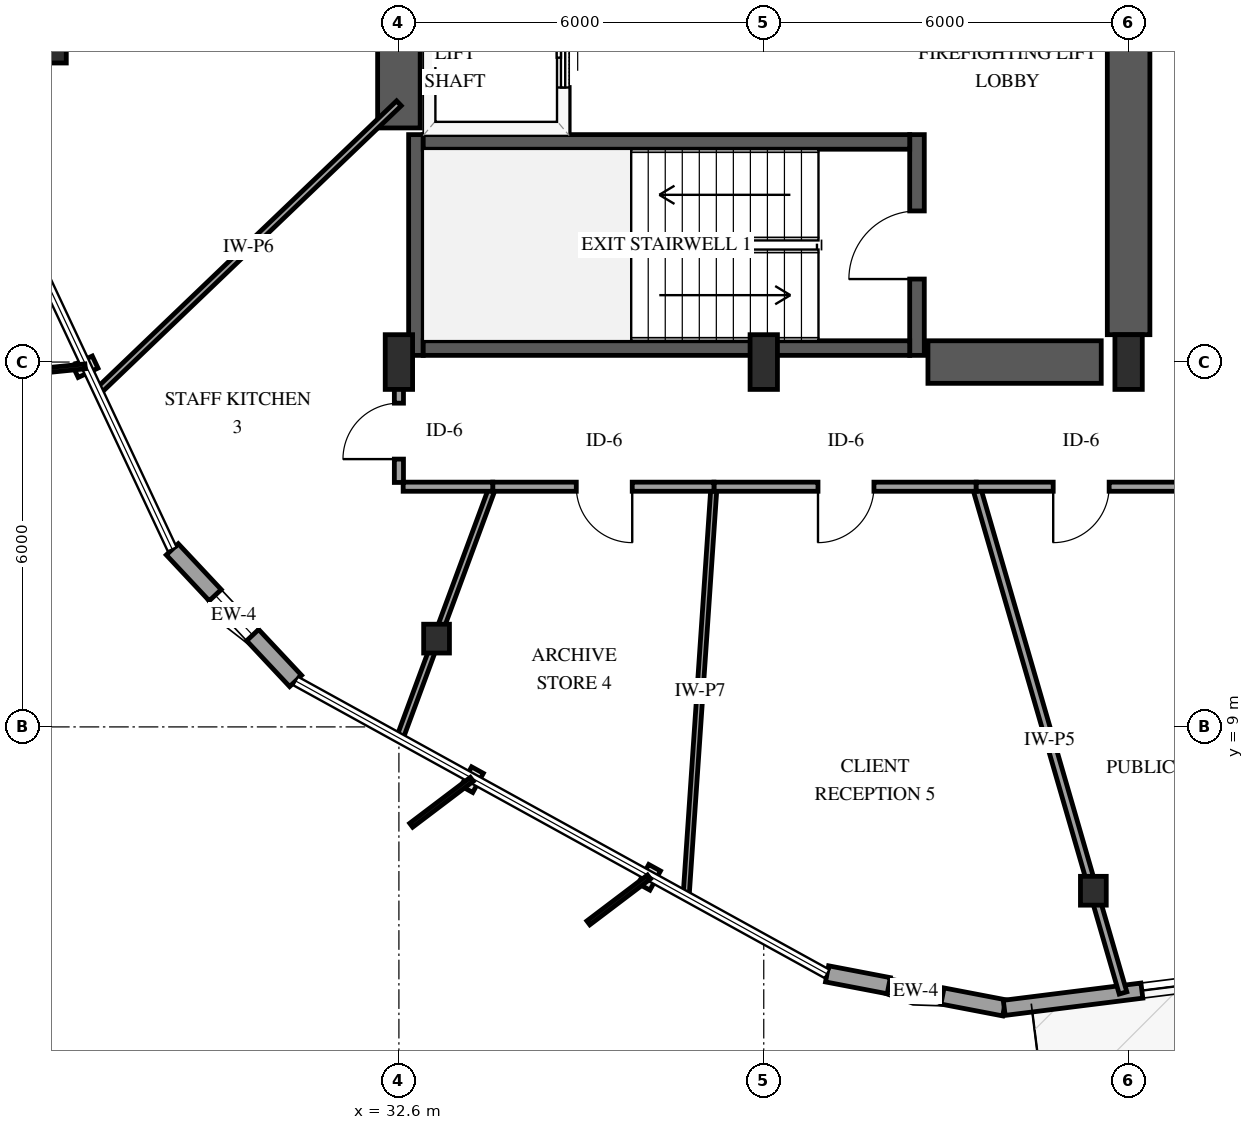
"""IFC4 building model, lengths in metres.
Left out: names, types, materials, properties, quantities, classifications, styles, units other than length and angle.
Written with IfcOpenShell. Run it as: python <this file> out.ifc"""

import sys

from ifc_helpers import new_model, si_unit, direction, frame, frame_2d, origin, origin_2d, place, context, subcontext, project, spatial, rectangle, i_section, extrude, element, fill, save


model = new_model("IFC4")
c1 = context("Model", 3, precision=1e-05, world=origin(), true_north=direction((0.0, 1.0)))
c2 = subcontext(c1, "Body", "Model", "MODEL_VIEW")
j1 = project(units=[si_unit("LENGTHUNIT", "METRE"), si_unit("PLANEANGLEUNIT", "RADIAN")], contexts=[c1])
p1 = place(None, origin())
s1 = spatial("IfcSite", under=j1, at=p1, CompositionType="ELEMENT")
p2 = place(p1, origin())
s2 = spatial("IfcBuilding", under=s1, at=p2, CompositionType="ELEMENT")
p3 = place(p2, frame((0.0, 0.0, 54.6)))
s3 = spatial("IfcBuildingStorey", under=s2, at=p3, CompositionType="ELEMENT", Elevation=54.6)
p4 = place(p3, frame((32.88, 15.11, 0.0), z_axis=(0.0, 0.0, 1.0), x_axis=(0.0, 1.0, 0.0)))
e1 = element("IfcWall", 1, at=p4, inside=s3, PredefinedType="SHEAR", context=c2, shape_type="SweptSolid", body=[
    extrude(rectangle(XDim=3.63, YDim=0.24, at=frame_2d((1.815, 0.0))), origin(), (0.0, 0.0, 1.0), 4.0),
])
p5 = place(p3, frame((41.12, 15.11, 0.0), z_axis=(0.0, 0.0, 1.0), x_axis=(0.0, 1.0, 0.0)))
e2 = element("IfcWall", 2, at=p5, inside=s3, PredefinedType="SHEAR", context=c2, shape_type="SweptSolid", body=[
    extrude(rectangle(XDim=3.63, YDim=0.24, at=frame_2d((1.815, 0.0))), origin(), (0.0, 0.0, 1.0), 4.0),
])
p6 = place(p5, frame((1.255, 0.0, 0.0)))
e3 = element("IfcOpeningElement", 3, at=p6, cuts=e2, PredefinedType="OPENING", context=c2, shape_type="SweptSolid", body=[
    extrude(rectangle(XDim=1.12, YDim=2.15, at=frame_2d((0.56, 1.075))), frame((0.0, 0.13, 0.0), z_axis=(0.0, -1.0, 0.0), x_axis=(1.0, 0.0, 0.0)), (0.0, 0.0, 1.0), 0.26),
])
for number, where, z_axis, x_axis in (
    (4, (33.0, 15.23, 0.0), (0.0, 0.0, 1.0), (1.0, 0.0, 0.0)),
    (5, (33.0, 18.62, 0.0), (0.0, 0.0, 1.0), (1.0, 0.0, 0.0)),
):
    element("IfcWall", number, at=place(p3, frame(where, z_axis=z_axis, x_axis=x_axis)), inside=s3, PredefinedType="SHEAR", context=c2, shape_type="SweptSolid", body=[
        extrude(rectangle(XDim=8.0, YDim=0.24, at=frame_2d((4.0, 0.0))), origin(), (0.0, 0.0, 1.0), 4.0),
    ])
p7 = place(p3, frame((32.6, 18.85, 0.0), z_axis=(0.0, 0.0, 1.0), x_axis=(0.0, 1.0, 0.0)))
e6 = element("IfcWall", 6, at=p7, inside=s3, PredefinedType="SHEAR", context=c2, shape_type="SweptSolid", body=[
    extrude(rectangle(XDim=12.3, YDim=0.7, at=frame_2d((6.15, 0.0))), origin(), (0.0, 0.0, 1.0), 4.0),
])
p8 = place(p3, frame((41.3, 15.0, 0.0), z_axis=(0.0, 0.0, 1.0), x_axis=(1.0, 0.0, 0.0)))
e7 = element("IfcWall", 7, at=p8, inside=s3, PredefinedType="SHEAR", context=c2, shape_type="SweptSolid", body=[
    extrude(rectangle(XDim=2.85, YDim=0.7, at=frame_2d((1.425, 0.0))), origin(), (0.0, 0.0, 1.0), 4.0),
])
p9 = place(p3, frame((44.6, 15.45, 0.0), z_axis=(0.0, 0.0, 1.0), x_axis=(0.0, 1.0, 0.0)))
e8 = element("IfcWall", 8, at=p9, inside=s3, PredefinedType="SHEAR", context=c2, shape_type="SweptSolid", body=[
    extrude(rectangle(XDim=6.35, YDim=0.7, at=frame_2d((3.175, 0.0))), origin(), (0.0, 0.0, 1.0), 4.0),
])
for number, where, z_axis, x_axis in (
    (9, (32.6, 15.0, 0.0), (0.0, 0.0, 1.0), (1.0, 0.0, 0.0)),
    (10, (38.6, 15.0, 0.0), (0.0, 0.0, 1.0), (1.0, 0.0, 0.0)),
    (11, (44.6, 15.0, 0.0), (0.0, 0.0, 1.0), (1.0, 0.0, 0.0)),
):
    element("IfcColumn", number, at=place(p3, frame(where, z_axis=z_axis, x_axis=x_axis)), inside=s3, PredefinedType="PILASTER", context=c2, shape_type="SweptSolid", body=[
        extrude(rectangle(XDim=0.45, YDim=0.9, at=origin_2d()), origin(), (0.0, 0.0, 1.0), 4.0),
    ])
for number, where, z_axis, x_axis in (
    (12, (26.918, 20.155, 0.0), (0.0, 0.0, 1.0), (1.0, 0.0, 0.0)),
    (13, (33.219, 10.452, 0.0), (0.0, 0.0, 1.0), (1.0, 0.0, 0.0)),
    (14, (44.02, 6.306, 0.0), (0.0, 0.0, 1.0), (1.0, 0.0, 0.0)),
):
    element("IfcColumn", number, at=place(p3, frame(where, z_axis=z_axis, x_axis=x_axis)), inside=s3, PredefinedType="COLUMN", context=c2, shape_type="SweptSolid", body=[
        extrude(i_section(OverallWidth=0.424, OverallDepth=0.474, WebThickness=0.048, FlangeThickness=0.077, FilletRadius=0.038, at=origin_2d()), origin(), (0.0, 0.0, 1.0), 4.0),
    ])
p10 = place(p3, frame((28.873, 11.92, 0.0), z_axis=(0.0, 0.0, 1.0), x_axis=(0.683815190571, -0.729655250885, 0.0)))
e15 = element("IfcWall", 15, at=p10, inside=s3, PredefinedType="SOLIDWALL", context=c2, shape_type="SweptSolid", body=[
    extrude(rectangle(XDim=2.967, YDim=0.27, at=frame_2d((1.483, 0.0))), origin(), (0.0, 0.0, 1.0), 3.079),
])
p11 = place(p10, frame((1.033, 0.0, 0.75)))
e16 = element("IfcOpeningElement", 16, at=p11, cuts=e15, PredefinedType="OPENING", context=c2, shape_type="SweptSolid", body=[
    extrude(rectangle(XDim=0.9, YDim=1.5, at=frame_2d((0.45, 0.75))), frame((0.0, 0.145, 0.0), z_axis=(0.0, -1.0, 0.0), x_axis=(1.0, 0.0, 0.0)), (0.0, 0.0, 1.0), 0.29),
])
p12 = place(p3, frame((39.641, 4.939, 0.0), z_axis=(0.0, 0.0, 1.0), x_axis=(0.982094979425, -0.188386441624, 0.0)))
e17 = element("IfcWall", 17, at=p12, inside=s3, PredefinedType="SOLIDWALL", context=c2, shape_type="SweptSolid", body=[
    extrude(rectangle(XDim=2.967, YDim=0.27, at=frame_2d((1.483, 0.0))), origin(), (0.0, 0.0, 1.0), 3.079),
])
p13 = place(p12, frame((1.033, 0.0, 0.75)))
e18 = element("IfcOpeningElement", 18, at=p13, cuts=e17, PredefinedType="OPENING", context=c2, shape_type="SweptSolid", body=[
    extrude(rectangle(XDim=0.9, YDim=1.5, at=frame_2d((0.45, 0.75))), frame((0.0, 0.145, 0.0), z_axis=(0.0, -1.0, 0.0), x_axis=(1.0, 0.0, 0.0)), (0.0, 0.0, 1.0), 0.29),
])
p14 = place(p3, frame((42.554, 4.38, 0.0), z_axis=(0.0, 0.0, 1.0), x_axis=(0.992243587308, 0.124308742439, 0.0)))
e19 = element("IfcWall", 19, at=p14, inside=s3, PredefinedType="SOLIDWALL", context=c2, shape_type="SweptSolid", body=[
    extrude(rectangle(XDim=9.979, YDim=0.25, at=frame_2d((4.99, 0.0))), origin(), (0.0, 0.0, 1.0), 3.079),
])
p15 = place(p14, frame((4.49, 0.0, 0.0)))
e20 = element("IfcOpeningElement", 20, at=p15, cuts=e19, PredefinedType="OPENING", context=c2, shape_type="SweptSolid", body=[
    extrude(rectangle(XDim=1.05, YDim=2.15, at=frame_2d((0.525, 1.075))), frame((0.0, 0.135, 0.0), z_axis=(0.0, -1.0, 0.0), x_axis=(1.0, 0.0, 0.0)), (0.0, 0.0, 1.0), 0.27),
])
p16 = place(p14, frame((2.281, 0.0, 0.72)))
e21 = element("IfcOpeningElement", 21, at=p16, cuts=e19, PredefinedType="OPENING", context=c2, shape_type="SweptSolid", body=[
    extrude(rectangle(XDim=1.2, YDim=1.6, at=frame_2d((0.6, 0.8))), frame((0.0, 0.135, 0.0), z_axis=(0.0, -1.0, 0.0), x_axis=(1.0, 0.0, 0.0)), (0.0, 0.0, 1.0), 0.27),
])
p17 = place(p14, frame((7.799, 0.0, 0.72)))
e22 = element("IfcOpeningElement", 22, at=p17, cuts=e19, PredefinedType="OPENING", context=c2, shape_type="SweptSolid", body=[
    extrude(rectangle(XDim=1.2, YDim=1.6, at=frame_2d((0.6, 0.8))), frame((0.0, 0.135, 0.0), z_axis=(0.0, -1.0, 0.0), x_axis=(1.0, 0.0, 0.0)), (0.0, 0.0, 1.0), 0.27),
])
p18 = place(p3, frame((35.3, 18.79, 0.0), z_axis=(0.0, 0.0, 1.0), x_axis=(0.0, 1.0, 0.0)))
e23 = element("IfcWall", 23, at=p18, inside=s3, PredefinedType="SOLIDWALL", context=c2, shape_type="SweptSolid", body=[
    extrude(rectangle(XDim=2.55, YDim=0.2, at=frame_2d((1.275, 0.0))), origin(), (0.0, 0.0, 1.0), 3.7),
])
p19 = place(p18, frame((0.725, 0.0, 0.0)))
e24 = element("IfcOpeningElement", 24, at=p19, cuts=e23, PredefinedType="OPENING", context=c2, shape_type="SweptSolid", body=[
    extrude(rectangle(XDim=1.1, YDim=2.15, at=frame_2d((0.55, 1.075))), frame((0.0, 0.11, 0.0), z_axis=(0.0, -1.0, 0.0), x_axis=(1.0, 0.0, 0.0)), (0.0, 0.0, 1.0), 0.22),
])
p20 = place(p3, frame((42.094, 12.95, 0.0), z_axis=(0.0, 0.0, 1.0), x_axis=(0.278506003646, -0.960434488101, 0.0)))
e25 = element("IfcWall", 25, at=p20, inside=s3, PredefinedType="PARTITIONING", context=c2, shape_type="SweptSolid", body=[
    extrude(rectangle(XDim=8.668, YDim=0.13, at=frame_2d((4.334, 0.0))), origin(), (0.0, 0.0, 1.0), 2.995),
])
p21 = place(p3, frame((32.6, 19.255, 0.0), z_axis=(0.0, 0.0, 1.0), x_axis=(-0.72235688482, -0.691520448687, 0.0)))
e26 = element("IfcWall", 26, at=p21, inside=s3, PredefinedType="PARTITIONING", context=c2, shape_type="SweptSolid", body=[
    extrude(rectangle(XDim=6.848, YDim=0.11, at=frame_2d((3.424, 0.0))), origin(), (0.0, 0.0, 1.0), 3.7),
])
p22 = place(p3, frame((37.781, 12.95, 0.0), z_axis=(0.0, 0.0, 1.0), x_axis=(-0.067858593443, -0.997694949018, 0.0)))
e27 = element("IfcWall", 27, at=p22, inside=s3, PredefinedType="PARTITIONING", context=c2, shape_type="SweptSolid", body=[
    extrude(rectangle(XDim=6.75, YDim=0.1, at=frame_2d((3.375, 0.0))), origin(), (0.0, 0.0, 1.0), 3.7),
])
p23 = place(p3, frame((34.143, 12.95, 0.0), z_axis=(0.0, 0.0, 1.0), x_axis=(-0.346807845611, -0.937936201574, 0.0)))
e28 = element("IfcWall", 28, at=p23, inside=s3, PredefinedType="PARTITIONING", context=c2, shape_type="SweptSolid", body=[
    extrude(rectangle(XDim=4.412, YDim=0.11, at=frame_2d((2.206, 0.0))), origin(), (0.0, 0.0, 1.0), 2.995),
])
p24 = place(p3, frame((42.094, 12.95, 0.0), z_axis=(0.0, 0.0, 1.0), x_axis=(-1.0, 0.0, 0.0)))
e29 = element("IfcWall", 29, at=p24, inside=s3, PredefinedType="PARTITIONING", context=c2, shape_type="SweptSolid", body=[
    extrude(rectangle(XDim=4.313, YDim=0.15, at=frame_2d((2.156, 0.0))), origin(), (0.0, 0.0, 1.0), 3.7),
])
p25 = place(p24, frame((1.682, 0.0, 0.0)))
e30 = element("IfcOpeningElement", 30, at=p25, cuts=e29, PredefinedType="OPENING", context=c2, shape_type="SweptSolid", body=[
    extrude(rectangle(XDim=0.92, YDim=2.12, at=frame_2d((0.46, 1.06))), frame((0.0, 0.085, 0.0), z_axis=(0.0, -1.0, 0.0), x_axis=(1.0, 0.0, 0.0)), (0.0, 0.0, 1.0), 0.17),
])
p26 = place(p3, frame((37.781, 12.95, 0.0), z_axis=(0.0, 0.0, 1.0), x_axis=(-1.0, 0.0, 0.0)))
e31 = element("IfcWall", 31, at=p26, inside=s3, PredefinedType="PARTITIONING", context=c2, shape_type="SweptSolid", body=[
    extrude(rectangle(XDim=3.638, YDim=0.15, at=frame_2d((1.819, 0.0))), origin(), (0.0, 0.0, 1.0), 3.7),
])
p27 = place(p26, frame((1.344, 0.0, 0.0)))
e32 = element("IfcOpeningElement", 32, at=p27, cuts=e31, PredefinedType="OPENING", context=c2, shape_type="SweptSolid", body=[
    extrude(rectangle(XDim=0.92, YDim=2.12, at=frame_2d((0.46, 1.06))), frame((0.0, 0.085, 0.0), z_axis=(0.0, -1.0, 0.0), x_axis=(1.0, 0.0, 0.0)), (0.0, 0.0, 1.0), 0.17),
])
p28 = place(p3, frame((45.517, 12.95, 0.0), z_axis=(0.0, 0.0, 1.0), x_axis=(-1.0, 0.0, 0.0)))
e33 = element("IfcWall", 33, at=p28, inside=s3, PredefinedType="PARTITIONING", context=c2, shape_type="SweptSolid", body=[
    extrude(rectangle(XDim=3.423, YDim=0.15, at=frame_2d((1.711, 0.0))), origin(), (0.0, 0.0, 1.0), 3.7),
])
p29 = place(p28, frame((1.237, 0.0, 0.0)))
e34 = element("IfcOpeningElement", 34, at=p29, cuts=e33, PredefinedType="OPENING", context=c2, shape_type="SweptSolid", body=[
    extrude(rectangle(XDim=0.92, YDim=2.12, at=frame_2d((0.46, 1.06))), frame((0.0, 0.085, 0.0), z_axis=(0.0, -1.0, 0.0), x_axis=(1.0, 0.0, 0.0)), (0.0, 0.0, 1.0), 0.17),
])
p30 = place(p3, frame((32.6, 13.02, 0.0), z_axis=(0.0, 0.0, 1.0), x_axis=(0.0, 1.0, 0.0)))
e35 = element("IfcWall", 35, at=p30, inside=s3, PredefinedType="PARTITIONING", context=c2, shape_type="SweptSolid", body=[
    extrude(rectangle(XDim=1.91, YDim=0.15, at=frame_2d((0.955, 0.0))), origin(), (0.0, 0.0, 1.0), 3.7),
])
p31 = place(p30, frame((0.384, 0.0, 0.0)))
e36 = element("IfcOpeningElement", 36, at=p31, cuts=e35, PredefinedType="OPENING", context=c2, shape_type="SweptSolid", body=[
    extrude(rectangle(XDim=0.92, YDim=2.12, at=frame_2d((0.46, 1.06))), frame((0.0, 0.085, 0.0), z_axis=(0.0, -1.0, 0.0), x_axis=(1.0, 0.0, 0.0)), (0.0, 0.0, 1.0), 0.17),
])
p32 = place(p3, frame((34.143, 12.95, 0.0), z_axis=(0.0, 0.0, 1.0), x_axis=(-1.0, 0.0, 0.0)))
e37 = element("IfcWall", 37, at=p32, inside=s3, PredefinedType="PARTITIONING", context=c2, shape_type="SweptSolid", body=[
    extrude(rectangle(XDim=1.473, YDim=0.15, at=frame_2d((0.737, 0.0))), origin(), (0.0, 0.0, 1.0), 3.7),
])
p33 = place(p11, origin())
e38 = element("IfcWindow", 38, at=p33, inside=s3, PartitioningType="SINGLE_PANEL", PredefinedType="WINDOW", context=c2, shape_type="SweptSolid", body=[
    extrude(rectangle(XDim=0.9, YDim=1.5, at=frame_2d((0.45, 0.75))), frame((0.0, 0.03, 0.0), z_axis=(0.0, -1.0, 0.0), x_axis=(1.0, 0.0, 0.0)), (0.0, 0.0, 1.0), 0.06),
])
fill(e16, e38)
p34 = place(p13, origin())
e39 = element("IfcWindow", 39, at=p34, inside=s3, PartitioningType="SINGLE_PANEL", PredefinedType="WINDOW", context=c2, shape_type="SweptSolid", body=[
    extrude(rectangle(XDim=0.9, YDim=1.5, at=frame_2d((0.45, 0.75))), frame((0.0, 0.03, 0.0), z_axis=(0.0, -1.0, 0.0), x_axis=(1.0, 0.0, 0.0)), (0.0, 0.0, 1.0), 0.06),
])
fill(e18, e39)
p35 = place(p16, origin())
e40 = element("IfcWindow", 40, at=p35, inside=s3, PartitioningType="SINGLE_PANEL", PredefinedType="WINDOW", context=c2, shape_type="SweptSolid", body=[
    extrude(rectangle(XDim=1.2, YDim=1.6, at=frame_2d((0.6, 0.8))), frame((0.0, 0.03, 0.0), z_axis=(0.0, -1.0, 0.0), x_axis=(1.0, 0.0, 0.0)), (0.0, 0.0, 1.0), 0.06),
])
fill(e21, e40)
p36 = place(p19, origin())
e41 = element("IfcDoor", 41, at=p36, inside=s3, OperationType="SLIDING_TO_LEFT", PredefinedType="DOOR", context=c2, shape_type="SweptSolid", body=[
    extrude(rectangle(XDim=1.1, YDim=2.15, at=frame_2d((0.55, 1.075))), frame((0.0, 0.025, 0.0), z_axis=(0.0, -1.0, 0.0), x_axis=(1.0, 0.0, 0.0)), (0.0, 0.0, 1.0), 0.05),
])
fill(e24, e41)
p37 = place(p6, origin())
e42 = element("IfcDoor", 42, at=p37, inside=s3, OperationType="SINGLE_SWING_LEFT", PredefinedType="DOOR", context=c2, shape_type="SweptSolid", body=[
    extrude(rectangle(XDim=1.12, YDim=2.15, at=frame_2d((0.56, 1.075))), frame((0.0, 0.025, 0.0), z_axis=(0.0, -1.0, 0.0), x_axis=(1.0, 0.0, 0.0)), (0.0, 0.0, 1.0), 0.05),
])
fill(e3, e42)
p38 = place(p25, origin())
e43 = element("IfcDoor", 43, at=p38, inside=s3, OperationType="SINGLE_SWING_RIGHT", PredefinedType="DOOR", context=c2, shape_type="SweptSolid", body=[
    extrude(rectangle(XDim=0.92, YDim=2.12, at=frame_2d((0.46, 1.06))), frame((0.0, 0.025, 0.0), z_axis=(0.0, -1.0, 0.0), x_axis=(1.0, 0.0, 0.0)), (0.0, 0.0, 1.0), 0.05),
])
fill(e30, e43)
p39 = place(p27, origin())
e44 = element("IfcDoor", 44, at=p39, inside=s3, OperationType="SINGLE_SWING_LEFT", PredefinedType="DOOR", context=c2, shape_type="SweptSolid", body=[
    extrude(rectangle(XDim=0.92, YDim=2.12, at=frame_2d((0.46, 1.06))), frame((0.0, 0.025, 0.0), z_axis=(0.0, -1.0, 0.0), x_axis=(1.0, 0.0, 0.0)), (0.0, 0.0, 1.0), 0.05),
])
fill(e32, e44)
p40 = place(p29, origin())
e45 = element("IfcDoor", 45, at=p40, inside=s3, OperationType="SINGLE_SWING_RIGHT", PredefinedType="DOOR", context=c2, shape_type="SweptSolid", body=[
    extrude(rectangle(XDim=0.92, YDim=2.12, at=frame_2d((0.46, 1.06))), frame((0.0, 0.025, 0.0), z_axis=(0.0, -1.0, 0.0), x_axis=(1.0, 0.0, 0.0)), (0.0, 0.0, 1.0), 0.05),
])
fill(e34, e45)
p41 = place(p31, origin())
e46 = element("IfcDoor", 46, at=p41, inside=s3, OperationType="SINGLE_SWING_LEFT", PredefinedType="DOOR", context=c2, shape_type="SweptSolid", body=[
    extrude(rectangle(XDim=0.92, YDim=2.12, at=frame_2d((0.46, 1.06))), frame((0.0, 0.025, 0.0), z_axis=(0.0, -1.0, 0.0), x_axis=(1.0, 0.0, 0.0)), (0.0, 0.0, 1.0), 0.05),
])
fill(e36, e46)
save(model, sys.argv[1])
